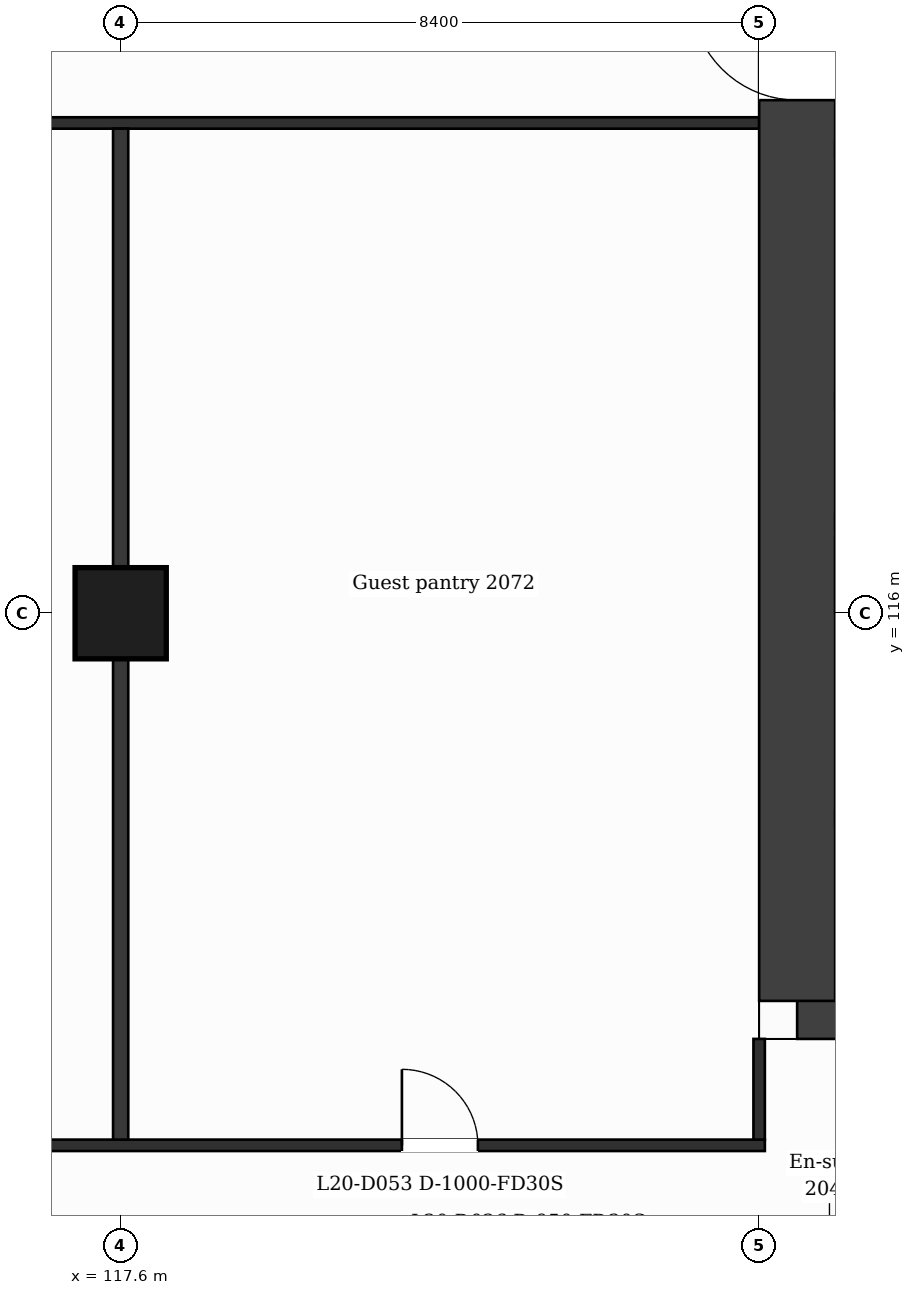
"""IFC4 building model, lengths in metres.
Left out: names, types, materials, properties, quantities, classifications, styles, units other than length and angle.
Written with IfcOpenShell. Run it as: python <this file> out.ifc"""

import sys

from ifc_helpers import new_model, si_unit, direction, frame, frame_2d, origin, origin_2d, place, context, subcontext, project, spatial, rectangle, extrude, element, fill, save


model = new_model("IFC4")
c1 = context("Model", 3, precision=1e-05, world=origin(), true_north=direction((0.0, 1.0)))
c2 = subcontext(c1, "Body", "Model", "MODEL_VIEW")
j1 = project(units=[si_unit("LENGTHUNIT", "METRE"), si_unit("PLANEANGLEUNIT", "RADIAN")], contexts=[c1])
p1 = place(None, origin())
s1 = spatial("IfcSite", under=j1, at=p1, CompositionType="ELEMENT")
p2 = place(p1, origin())
s2 = spatial("IfcBuilding", under=s1, at=p2, CompositionType="ELEMENT")
p3 = place(p2, frame((0.0, 0.0, 91.0)))
s3 = spatial("IfcBuildingStorey", under=s2, at=p3, CompositionType="ELEMENT", Elevation=91.0)
p4 = place(p3, frame((140.559, 110.9, 0.0), z_axis=(0.0, 0.0, 1.0), x_axis=(-1.0, 0.0, 0.0)))
e1 = element("IfcWall", 1, at=p4, inside=s3, PredefinedType="SHEAR", context=c2, shape_type="SweptSolid", body=[
    extrude(rectangle(XDim=14.059, YDim=1.0, at=frame_2d((7.029, 0.0))), origin(), (0.0, 0.0, 1.0), 3.7),
])
p5 = place(p4, frame((6.858, 0.0, 0.0)))
e2 = element("IfcOpeningElement", 2, at=p5, cuts=e1, PredefinedType="OPENING", context=c2, shape_type="SweptSolid", body=[
    extrude(rectangle(XDim=1.4, YDim=2.1, at=frame_2d((0.7, 1.05))), frame((0.0, 0.51, 0.0), z_axis=(0.0, -1.0, 0.0), x_axis=(1.0, 0.0, 0.0)), (0.0, 0.0, 1.0), 1.02),
])
p6 = place(p3, frame((126.5, 110.9, 0.0), z_axis=(0.0, 0.0, 1.0), x_axis=(0.0, 1.0, 0.0)))
e3 = element("IfcWall", 3, at=p6, inside=s3, PredefinedType="SHEAR", context=c2, shape_type="SweptSolid", body=[
    extrude(rectangle(XDim=21.0, YDim=1.0, at=frame_2d((10.5, 0.0))), origin(), (0.0, 0.0, 1.0), 3.7),
])
p7 = place(p6, frame((11.85, 0.0, 0.0)))
e4 = element("IfcOpeningElement", 4, at=p7, cuts=e3, PredefinedType="OPENING", context=c2, shape_type="SweptSolid", body=[
    extrude(rectangle(XDim=1.4, YDim=2.1, at=frame_2d((0.7, 1.05))), frame((0.0, 0.51, 0.0), z_axis=(0.0, -1.0, 0.0), x_axis=(1.0, 0.0, 0.0)), (0.0, 0.0, 1.0), 1.02),
])
p8 = place(p3, frame((117.6, 116.0, 0.0), z_axis=(0.0, 0.0, 1.0), x_axis=(1.0, 0.0, 0.0)))
e5 = element("IfcColumn", 5, at=p8, inside=s3, PredefinedType="COLUMN", context=c2, shape_type="SweptSolid", body=[
    extrude(rectangle(XDim=1.2, YDim=1.2, at=origin_2d()), origin(), (0.0, 0.0, 1.0), 3.7),
])
p9 = place(p3, frame((100.725, 109.0, 0.0), z_axis=(0.0, 0.0, 1.0), x_axis=(1.0, 0.0, 0.0)))
e6 = element("IfcWall", 6, at=p9, inside=s3, PredefinedType="PARTITIONING", context=c2, shape_type="SweptSolid", body=[
    extrude(rectangle(XDim=25.35, YDim=0.15, at=frame_2d((12.675, 0.0))), origin(), (0.0, 0.0, 1.0), 3.38),
])
p10 = place(p9, frame((1.675, 0.0, 0.0)))
e7 = element("IfcOpeningElement", 7, at=p10, cuts=e6, PredefinedType="OPENING", context=c2, shape_type="SweptSolid", body=[
    extrude(rectangle(XDim=1.0, YDim=2.1, at=frame_2d((0.5, 1.05))), frame((0.0, 0.085, 0.0), z_axis=(0.0, -1.0, 0.0), x_axis=(1.0, 0.0, 0.0)), (0.0, 0.0, 1.0), 0.17),
])
p11 = place(p9, frame((6.5, 0.0, 0.0)))
e8 = element("IfcOpeningElement", 8, at=p11, cuts=e6, PredefinedType="OPENING", context=c2, shape_type="SweptSolid", body=[
    extrude(rectangle(XDim=1.0, YDim=2.1, at=frame_2d((0.5, 1.05))), frame((0.0, 0.085, 0.0), z_axis=(0.0, -1.0, 0.0), x_axis=(1.0, 0.0, 0.0)), (0.0, 0.0, 1.0), 0.17),
])
p12 = place(p9, frame((9.45, 0.0, 0.0)))
e9 = element("IfcOpeningElement", 9, at=p12, cuts=e6, PredefinedType="OPENING", context=c2, shape_type="SweptSolid", body=[
    extrude(rectangle(XDim=1.0, YDim=2.1, at=frame_2d((0.5, 1.05))), frame((0.0, 0.085, 0.0), z_axis=(0.0, -1.0, 0.0), x_axis=(1.0, 0.0, 0.0)), (0.0, 0.0, 1.0), 0.17),
])
p13 = place(p9, frame((13.65, 0.0, 0.0)))
e10 = element("IfcOpeningElement", 10, at=p13, cuts=e6, PredefinedType="OPENING", context=c2, shape_type="SweptSolid", body=[
    extrude(rectangle(XDim=1.0, YDim=2.1, at=frame_2d((0.5, 1.05))), frame((0.0, 0.085, 0.0), z_axis=(0.0, -1.0, 0.0), x_axis=(1.0, 0.0, 0.0)), (0.0, 0.0, 1.0), 0.17),
])
p14 = place(p9, frame((20.575, 0.0, 0.0)))
e11 = element("IfcOpeningElement", 11, at=p14, cuts=e6, PredefinedType="OPENING", context=c2, shape_type="SweptSolid", body=[
    extrude(rectangle(XDim=1.0, YDim=2.1, at=frame_2d((0.5, 1.05))), frame((0.0, 0.085, 0.0), z_axis=(0.0, -1.0, 0.0), x_axis=(1.0, 0.0, 0.0)), (0.0, 0.0, 1.0), 0.17),
])
p15 = place(p3, frame((127.0, 113.3, 0.0), z_axis=(0.0, 0.0, 1.0), x_axis=(1.0, 0.0, 0.0)))
e12 = element("IfcWall", 12, at=p15, inside=s3, PredefinedType="PARTITIONING", context=c2, shape_type="SweptSolid", body=[
    extrude(rectangle(XDim=4.673, YDim=0.2, at=frame_2d((2.336, 0.0))), origin(), (0.0, 0.0, 1.0), 3.38),
])
p16 = place(p15, frame((0.472, 0.0, 0.0)))
e13 = element("IfcOpeningElement", 13, at=p16, cuts=e12, PredefinedType="OPENING", context=c2, shape_type="SweptSolid", body=[
    extrude(rectangle(XDim=1.1, YDim=2.1, at=frame_2d((0.55, 1.05))), frame((0.0, 0.11, 0.0), z_axis=(0.0, -1.0, 0.0), x_axis=(1.0, 0.0, 0.0)), (0.0, 0.0, 1.0), 0.22),
])
p17 = place(p3, frame((100.8, 122.45, 0.0), z_axis=(0.0, 0.0, 1.0), x_axis=(1.0, 0.0, 0.0)))
e14 = element("IfcWall", 14, at=p17, inside=s3, PredefinedType="PARTITIONING", context=c2, shape_type="SweptSolid", body=[
    extrude(rectangle(XDim=25.2, YDim=0.15, at=frame_2d((12.6, 0.0))), origin(), (0.0, 0.0, 1.0), 3.38),
])
p18 = place(p3, frame((117.6, 109.075, 0.0), z_axis=(0.0, 0.0, 1.0), x_axis=(0.0, 1.0, 0.0)))
e15 = element("IfcWall", 15, at=p18, inside=s3, PredefinedType="PARTITIONING", context=c2, shape_type="SweptSolid", body=[
    extrude(rectangle(XDim=13.3, YDim=0.2, at=frame_2d((6.65, 0.0))), origin(), (0.0, 0.0, 1.0), 3.38),
])
p19 = place(p3, frame((126.0, 109.075, 0.0), z_axis=(0.0, 0.0, 1.0), x_axis=(0.0, 1.0, 0.0)))
e16 = element("IfcWall", 16, at=p19, inside=s3, PredefinedType="PARTITIONING", context=c2, shape_type="SweptSolid", body=[
    extrude(rectangle(XDim=1.325, YDim=0.15, at=frame_2d((0.663, 0.0))), origin(), (0.0, 0.0, 1.0), 3.38),
])
p20 = place(p14, origin())
e17 = element("IfcDoor", 17, at=p20, inside=s3, OperationType="SINGLE_SWING_LEFT", PredefinedType="DOOR", context=c2, shape_type="SweptSolid", body=[
    extrude(rectangle(XDim=1.0, YDim=2.1, at=frame_2d((0.5, 1.05))), frame((0.0, 0.025, 0.0), z_axis=(0.0, -1.0, 0.0), x_axis=(1.0, 0.0, 0.0)), (0.0, 0.0, 1.0), 0.05),
])
fill(e11, e17)
p21 = place(p7, origin())
e18 = element("IfcDoor", 18, at=p21, inside=s3, OperationType="SINGLE_SWING_RIGHT", PredefinedType="DOOR", context=c2, shape_type="SweptSolid", body=[
    extrude(rectangle(XDim=1.4, YDim=2.1, at=frame_2d((0.7, 1.05))), frame((0.0, 0.025, 0.0), z_axis=(0.0, -1.0, 0.0), x_axis=(1.0, 0.0, 0.0)), (0.0, 0.0, 1.0), 0.05),
])
fill(e4, e18)
save(model, sys.argv[1])
